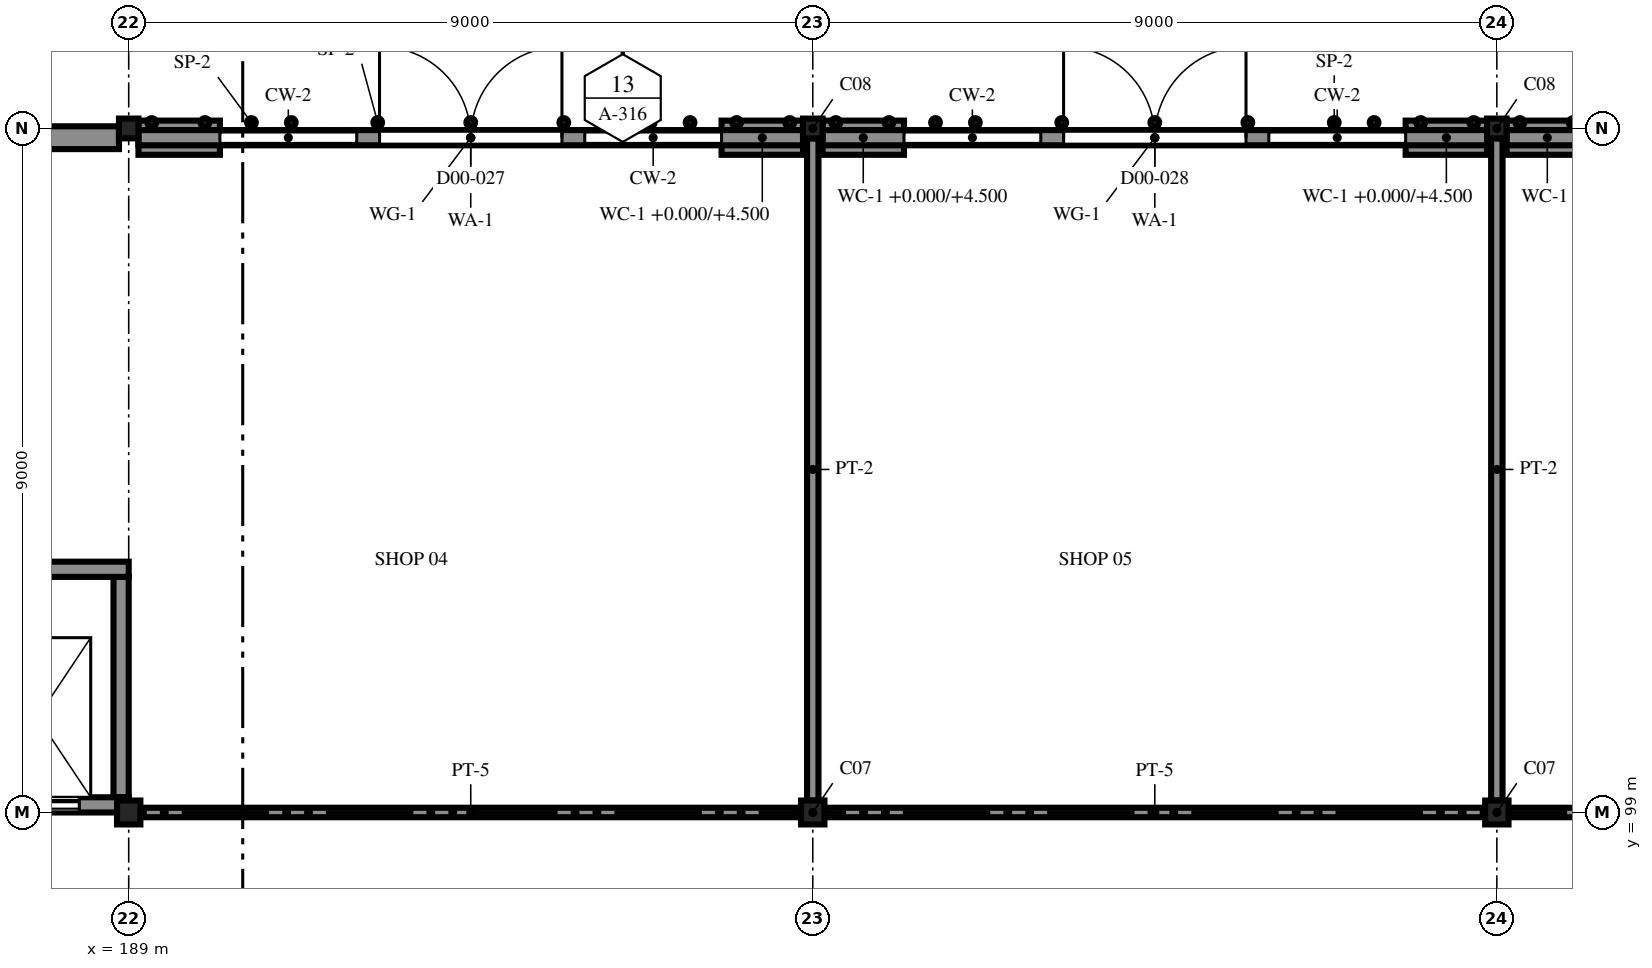
"""IFC4 building model, lengths in metres.
Left out: names, types, materials, properties, quantities, classifications, styles, units other than length and angle.
Written with IfcOpenShell. Run it as: python <this file> out.ifc"""

import sys

from ifc_helpers import new_model, si_unit, direction, frame, frame_2d, origin, origin_2d, place, context, subcontext, project, spatial, polyline, rectangle, i_section, outline, extrude, element, fill, save


model = new_model("IFC4")
c1 = context("Model", 3, precision=1e-05, world=origin(), true_north=direction((0.0, 1.0)))
c2 = subcontext(c1, "Body", "Model", "MODEL_VIEW")
j1 = project(units=[si_unit("LENGTHUNIT", "METRE"), si_unit("PLANEANGLEUNIT", "RADIAN")], contexts=[c1])
p1 = place(None, origin())
s1 = spatial("IfcSite", under=j1, at=p1, CompositionType="ELEMENT")
p2 = place(p1, origin())
s2 = spatial("IfcBuilding", under=s1, at=p2, CompositionType="ELEMENT")
p3 = place(p2, origin())
s3 = spatial("IfcBuildingStorey", under=s2, at=p3, CompositionType="ELEMENT", Elevation=0.0)
p4 = place(p3, frame((189.0, 99.0, -2.1), z_axis=(0.0, 0.0, 1.0), x_axis=(1.0, 0.0, 0.0)))
e1 = element("IfcColumn", 1, at=p4, inside=s3, PredefinedType="COLUMN", context=c2, shape_type="SweptSolid", body=[
    extrude(i_section(OverallWidth=0.307, OverallDepth=0.314, WebThickness=0.012, FlangeThickness=0.019, FilletRadius=0.015, at=origin_2d()), origin(), (0.0, 0.0, 1.0), 9.6),
])
p5 = place(p3, frame((189.0, 108.0, -2.1), z_axis=(0.0, 0.0, 1.0), x_axis=(1.0, 0.0, 0.0)))
e2 = element("IfcColumn", 2, at=p5, inside=s3, PredefinedType="COLUMN", context=c2, shape_type="SweptSolid", body=[
    extrude(i_section(OverallWidth=0.256, OverallDepth=0.26, WebThickness=0.01, FlangeThickness=0.017, FilletRadius=0.013, at=origin_2d()), origin(), (0.0, 0.0, 1.0), 9.6),
])
p6 = place(p3, frame((198.0, 99.0, -2.1), z_axis=(0.0, 0.0, 1.0), x_axis=(1.0, 0.0, 0.0)))
e3 = element("IfcColumn", 3, at=p6, inside=s3, PredefinedType="COLUMN", context=c2, shape_type="SweptSolid", body=[
    extrude(i_section(OverallWidth=0.307, OverallDepth=0.314, WebThickness=0.012, FlangeThickness=0.019, FilletRadius=0.015, at=origin_2d()), origin(), (0.0, 0.0, 1.0), 9.6),
])
p7 = place(p3, frame((198.0, 108.0, -2.1), z_axis=(0.0, 0.0, 1.0), x_axis=(1.0, 0.0, 0.0)))
e4 = element("IfcColumn", 4, at=p7, inside=s3, PredefinedType="COLUMN", context=c2, shape_type="SweptSolid", body=[
    extrude(i_section(OverallWidth=0.256, OverallDepth=0.26, WebThickness=0.01, FlangeThickness=0.017, FilletRadius=0.013, at=origin_2d()), origin(), (0.0, 0.0, 1.0), 9.6),
])
p8 = place(p3, frame((207.0, 99.0, -2.1), z_axis=(0.0, 0.0, 1.0), x_axis=(1.0, 0.0, 0.0)))
e5 = element("IfcColumn", 5, at=p8, inside=s3, PredefinedType="COLUMN", context=c2, shape_type="SweptSolid", body=[
    extrude(i_section(OverallWidth=0.307, OverallDepth=0.314, WebThickness=0.012, FlangeThickness=0.019, FilletRadius=0.015, at=origin_2d()), origin(), (0.0, 0.0, 1.0), 9.6),
])
p9 = place(p3, frame((207.0, 108.0, -2.1), z_axis=(0.0, 0.0, 1.0), x_axis=(1.0, 0.0, 0.0)))
e6 = element("IfcColumn", 6, at=p9, inside=s3, PredefinedType="COLUMN", context=c2, shape_type="SweptSolid", body=[
    extrude(i_section(OverallWidth=0.256, OverallDepth=0.26, WebThickness=0.01, FlangeThickness=0.017, FilletRadius=0.013, at=origin_2d()), origin(), (0.0, 0.0, 1.0), 9.6),
])
p10 = place(p3, frame((180.128, 107.878, 0.0), z_axis=(0.0, 0.0, 1.0), x_axis=(1.0, 0.0, 0.0)))
e7 = element("IfcWall", 7, at=p10, inside=s3, PredefinedType="SOLIDWALL", context=c2, shape_type="SweptSolid", body=[
    extrude(rectangle(XDim=8.744, YDim=0.3, at=frame_2d((4.372, 0.0))), origin(), (0.0, 0.0, 1.0), 6.692),
])
p11 = place(p10, frame((0.472, 0.0, 0.0)))
e8 = element("IfcOpeningElement", 8, at=p11, cuts=e7, PredefinedType="OPENING", context=c2, shape_type="SweptSolid", body=[
    extrude(rectangle(XDim=1.8, YDim=2.4, at=frame_2d((0.9, 1.2))), frame((0.0, 0.16, 0.0), z_axis=(0.0, -1.0, 0.0), x_axis=(1.0, 0.0, 0.0)), (0.0, 0.0, 1.0), 0.32),
])
p12 = place(p10, frame((0.772, 0.0, 2.55)))
e9 = element("IfcOpeningElement", 9, at=p12, cuts=e7, PredefinedType="OPENING", context=c2, shape_type="SweptSolid", body=[
    extrude(rectangle(XDim=1.2, YDim=0.6, at=frame_2d((0.6, 0.3))), frame((0.0, 0.16, 0.0), z_axis=(0.0, -1.0, 0.0), x_axis=(1.0, 0.0, 0.0)), (0.0, 0.0, 1.0), 0.32),
])
p13 = place(p10, frame((3.922, 0.0, 1.2)))
e10 = element("IfcOpeningElement", 10, at=p13, cuts=e7, PredefinedType="OPENING", context=c2, shape_type="SweptSolid", body=[
    extrude(rectangle(XDim=0.9, YDim=1.8, at=frame_2d((0.45, 0.9))), frame((0.0, 0.16, 0.0), z_axis=(0.0, -1.0, 0.0), x_axis=(1.0, 0.0, 0.0)), (0.0, 0.0, 1.0), 0.32),
])
p14 = place(p3, frame((189.128, 107.878, 0.0), z_axis=(0.0, 0.0, 1.0), x_axis=(1.0, 0.0, 0.0)))
e11 = element("IfcWall", 11, at=p14, inside=s3, PredefinedType="SOLIDWALL", context=c2, shape_type="SweptSolid", body=[
    extrude(rectangle(XDim=1.072, YDim=0.45, at=frame_2d((0.536, 0.0))), origin(), (0.0, 0.0, 1.0), 4.5),
])
p15 = place(p3, frame((192.0, 107.878, 0.0), z_axis=(0.0, 0.0, 1.0), x_axis=(1.0, 0.0, 0.0)))
e12 = element("IfcWall", 12, at=p15, inside=s3, PredefinedType="ELEMENTEDWALL", context=c2, shape_type="SweptSolid", body=[
    extrude(rectangle(XDim=3.0, YDim=0.15, at=frame_2d((1.5, 0.0))), origin(), (0.0, 0.0, 1.0), 4.5),
])
p16 = place(p15, frame((0.3, 0.0, 0.0)))
e13 = element("IfcOpeningElement", 13, at=p16, cuts=e12, PredefinedType="OPENING", context=c2, shape_type="SweptSolid", body=[
    extrude(rectangle(XDim=2.4, YDim=2.7, at=frame_2d((1.2, 1.35))), frame((0.0, 0.085, 0.0), z_axis=(0.0, -1.0, 0.0), x_axis=(1.0, 0.0, 0.0)), (0.0, 0.0, 1.0), 0.17),
])
p17 = place(p3, frame((196.8, 107.878, 0.0), z_axis=(0.0, 0.0, 1.0), x_axis=(1.0, 0.0, 0.0)))
e14 = element("IfcWall", 14, at=p17, inside=s3, PredefinedType="SOLIDWALL", context=c2, shape_type="SweptSolid", body=[
    extrude(rectangle(XDim=1.072, YDim=0.45, at=frame_2d((0.536, 0.0))), origin(), (0.0, 0.0, 1.0), 4.5),
])
p18 = place(p3, frame((189.128, 107.878, 4.9), z_axis=(0.0, 0.0, 1.0), x_axis=(1.0, 0.0, 0.0)))
e15 = element("IfcWall", 15, at=p18, inside=s3, PredefinedType="SOLIDWALL", context=c2, shape_type="SweptSolid", body=[
    extrude(rectangle(XDim=8.744, YDim=0.2, at=frame_2d((4.372, 0.0))), origin(), (0.0, 0.0, 1.0), 1.792),
])
p19 = place(p3, frame((198.128, 107.878, 0.0), z_axis=(0.0, 0.0, 1.0), x_axis=(1.0, 0.0, 0.0)))
e16 = element("IfcWall", 16, at=p19, inside=s3, PredefinedType="SOLIDWALL", context=c2, shape_type="SweptSolid", body=[
    extrude(rectangle(XDim=1.072, YDim=0.45, at=frame_2d((0.536, 0.0))), origin(), (0.0, 0.0, 1.0), 4.5),
])
p20 = place(p3, frame((201.0, 107.878, 0.0), z_axis=(0.0, 0.0, 1.0), x_axis=(1.0, 0.0, 0.0)))
e17 = element("IfcWall", 17, at=p20, inside=s3, PredefinedType="ELEMENTEDWALL", context=c2, shape_type="SweptSolid", body=[
    extrude(rectangle(XDim=3.0, YDim=0.15, at=frame_2d((1.5, 0.0))), origin(), (0.0, 0.0, 1.0), 4.5),
])
p21 = place(p20, frame((0.3, 0.0, 0.0)))
e18 = element("IfcOpeningElement", 18, at=p21, cuts=e17, PredefinedType="OPENING", context=c2, shape_type="SweptSolid", body=[
    extrude(rectangle(XDim=2.4, YDim=2.7, at=frame_2d((1.2, 1.35))), frame((0.0, 0.085, 0.0), z_axis=(0.0, -1.0, 0.0), x_axis=(1.0, 0.0, 0.0)), (0.0, 0.0, 1.0), 0.17),
])
p22 = place(p3, frame((205.8, 107.878, 0.0), z_axis=(0.0, 0.0, 1.0), x_axis=(1.0, 0.0, 0.0)))
e19 = element("IfcWall", 19, at=p22, inside=s3, PredefinedType="SOLIDWALL", context=c2, shape_type="SweptSolid", body=[
    extrude(rectangle(XDim=1.072, YDim=0.45, at=frame_2d((0.536, 0.0))), origin(), (0.0, 0.0, 1.0), 4.5),
])
p23 = place(p3, frame((198.128, 107.878, 4.9), z_axis=(0.0, 0.0, 1.0), x_axis=(1.0, 0.0, 0.0)))
e20 = element("IfcWall", 20, at=p23, inside=s3, PredefinedType="SOLIDWALL", context=c2, shape_type="SweptSolid", body=[
    extrude(rectangle(XDim=8.744, YDim=0.2, at=frame_2d((4.372, 0.0))), origin(), (0.0, 0.0, 1.0), 1.792),
])
p24 = place(p3, frame((207.128, 107.878, 0.0), z_axis=(0.0, 0.0, 1.0), x_axis=(1.0, 0.0, 0.0)))
e21 = element("IfcWall", 21, at=p24, inside=s3, PredefinedType="SOLIDWALL", context=c2, shape_type="SweptSolid", body=[
    extrude(rectangle(XDim=1.072, YDim=0.45, at=frame_2d((0.536, 0.0))), origin(), (0.0, 0.0, 1.0), 4.5),
])
p25 = place(p3, frame((207.128, 107.878, 4.9), z_axis=(0.0, 0.0, 1.0), x_axis=(1.0, 0.0, 0.0)))
e22 = element("IfcWall", 22, at=p25, inside=s3, PredefinedType="SOLIDWALL", context=c2, shape_type="SweptSolid", body=[
    extrude(rectangle(XDim=8.744, YDim=0.2, at=frame_2d((4.372, 0.0))), origin(), (0.0, 0.0, 1.0), 1.792),
])
p26 = place(p3, frame((186.602, 99.1, -1.6), z_axis=(0.0, 0.0, 1.0), x_axis=(1.0, 0.0, 0.0)))
e23 = element("IfcWall", 23, at=p26, inside=s3, PredefinedType="SOLIDWALL", context=c2, shape_type="SweptSolid", body=[
    extrude(rectangle(XDim=2.398, YDim=0.2, at=frame_2d((1.199, 0.0))), origin(), (0.0, 0.0, 1.0), 8.357),
])
p27 = place(p26, frame((0.648, 0.0, 1.6)))
e24 = element("IfcOpeningElement", 24, at=p27, cuts=e23, PredefinedType="OPENING", context=c2, shape_type="SweptSolid", body=[
    extrude(rectangle(XDim=1.1, YDim=2.1, at=frame_2d((0.55, 1.05))), frame((0.0, 0.11, 0.0), z_axis=(0.0, -1.0, 0.0), x_axis=(1.0, 0.0, 0.0)), (0.0, 0.0, 1.0), 0.22),
])
p28 = place(p3, frame((186.602, 102.2, -1.6), z_axis=(0.0, 0.0, 1.0), x_axis=(1.0, 0.0, 0.0)))
e25 = element("IfcWall", 25, at=p28, inside=s3, PredefinedType="SOLIDWALL", context=c2, shape_type="SweptSolid", body=[
    extrude(rectangle(XDim=2.398, YDim=0.2, at=frame_2d((1.199, 0.0))), origin(), (0.0, 0.0, 1.0), 8.357),
])
p29 = place(p3, frame((188.9, 99.2, -1.6), z_axis=(0.0, 0.0, 1.0), x_axis=(0.0, 1.0, 0.0)))
e26 = element("IfcWall", 26, at=p29, inside=s3, PredefinedType="SOLIDWALL", context=c2, shape_type="SweptSolid", body=[
    extrude(rectangle(XDim=2.9, YDim=0.2, at=frame_2d((1.45, 0.0))), origin(), (0.0, 0.0, 1.0), 8.357),
])
for number, where, z_axis, x_axis in (
    (27, (207.154, 99.0, 0.0), (0.0, 0.0, 1.0), (1.0, 0.0, 0.0)),
    (28, (198.154, 99.0, 0.0), (0.0, 0.0, 1.0), (1.0, 0.0, 0.0)),
    (29, (189.154, 99.0, 0.0), (0.0, 0.0, 1.0), (1.0, 0.0, 0.0)),
):
    element("IfcWall", number, at=place(p3, frame(where, z_axis=z_axis, x_axis=x_axis)), inside=s3, PredefinedType="PARTITIONING", context=c2, shape_type="SweptSolid", body=[
        extrude(rectangle(XDim=8.692, YDim=0.125, at=frame_2d((4.346, 0.0))), origin(), (0.0, 0.0, 1.0), 6.757),
    ])
for number, where, z_axis, x_axis in (
    (30, (198.0, 107.87, 0.0), (0.0, 0.0, 1.0), (0.0, -1.0, 0.0)),
    (31, (207.0, 107.87, 0.0), (0.0, 0.0, 1.0), (0.0, -1.0, 0.0)),
):
    element("IfcWall", number, at=place(p3, frame(where, z_axis=z_axis, x_axis=x_axis)), inside=s3, PredefinedType="PARTITIONING", context=c2, shape_type="SweptSolid", body=[
        extrude(rectangle(XDim=8.713, YDim=0.15, at=frame_2d((4.356, 0.0))), origin(), (0.0, 0.0, 1.0), 6.6),
    ])
p30 = place(p16, origin())
e32 = element("IfcDoor", 32, at=p30, inside=s3, OperationType="DOUBLE_DOOR_SINGLE_SWING", PredefinedType="DOOR", context=c2, shape_type="SweptSolid", body=[
    extrude(outline(polyline([(0.0, 0.0), (0.07, 0.0), (0.07, 2.63), (2.33, 2.63), (2.33, 0.0), (2.4, 0.0), (2.4, 2.7), (0.0, 2.7), (0.0, 0.0)])), frame((0.0, 0.025, 0.0), z_axis=(0.0, -1.0, 0.0), x_axis=(1.0, 0.0, 0.0)), (0.0, 0.0, 1.0), 0.05),
    extrude(outline(polyline([(0.074, 0.01), (1.197, 0.01), (1.197, 2.626), (0.074, 2.626), (0.074, 0.01)]), holes=[polyline([(0.164, 0.31), (1.107, 0.31), (1.107, 2.536), (0.164, 2.536), (0.164, 0.31)])]), frame((0.0, 0.017, 0.0), z_axis=(0.0, -1.0, 0.0), x_axis=(1.0, 0.0, 0.0)), (0.0, 0.0, 1.0), 0.035),
    extrude(rectangle(XDim=0.943, YDim=2.226, at=frame_2d((0.635, 1.423))), frame((0.0, 0.006, 0.0), z_axis=(0.0, -1.0, 0.0), x_axis=(1.0, 0.0, 0.0)), (0.0, 0.0, 1.0), 0.012),
    extrude(outline(polyline([(1.203, 0.01), (2.326, 0.01), (2.326, 2.626), (1.203, 2.626), (1.203, 0.01)]), holes=[polyline([(1.293, 0.31), (2.236, 0.31), (2.236, 2.536), (1.293, 2.536), (1.293, 0.31)])]), frame((0.0, 0.017, 0.0), z_axis=(0.0, -1.0, 0.0), x_axis=(1.0, 0.0, 0.0)), (0.0, 0.0, 1.0), 0.035),
    extrude(rectangle(XDim=0.943, YDim=2.226, at=frame_2d((1.764, 1.423))), frame((0.0, 0.006, 0.0), z_axis=(0.0, -1.0, 0.0), x_axis=(1.0, 0.0, 0.0)), (0.0, 0.0, 1.0), 0.012),
])
fill(e13, e32)
p31 = place(p21, origin())
e33 = element("IfcDoor", 33, at=p31, inside=s3, OperationType="DOUBLE_DOOR_SINGLE_SWING", PredefinedType="DOOR", context=c2, shape_type="SweptSolid", body=[
    extrude(outline(polyline([(0.0, 0.0), (0.07, 0.0), (0.07, 2.63), (2.33, 2.63), (2.33, 0.0), (2.4, 0.0), (2.4, 2.7), (0.0, 2.7), (0.0, 0.0)])), frame((0.0, 0.025, 0.0), z_axis=(0.0, -1.0, 0.0), x_axis=(1.0, 0.0, 0.0)), (0.0, 0.0, 1.0), 0.05),
    extrude(outline(polyline([(0.074, 0.01), (1.197, 0.01), (1.197, 2.626), (0.074, 2.626), (0.074, 0.01)]), holes=[polyline([(0.164, 0.31), (1.107, 0.31), (1.107, 2.536), (0.164, 2.536), (0.164, 0.31)])]), frame((0.0, 0.017, 0.0), z_axis=(0.0, -1.0, 0.0), x_axis=(1.0, 0.0, 0.0)), (0.0, 0.0, 1.0), 0.035),
    extrude(rectangle(XDim=0.943, YDim=2.226, at=frame_2d((0.635, 1.423))), frame((0.0, 0.006, 0.0), z_axis=(0.0, -1.0, 0.0), x_axis=(1.0, 0.0, 0.0)), (0.0, 0.0, 1.0), 0.012),
    extrude(outline(polyline([(1.203, 0.01), (2.326, 0.01), (2.326, 2.626), (1.203, 2.626), (1.203, 0.01)]), holes=[polyline([(1.293, 0.31), (2.236, 0.31), (2.236, 2.536), (1.293, 2.536), (1.293, 0.31)])]), frame((0.0, 0.017, 0.0), z_axis=(0.0, -1.0, 0.0), x_axis=(1.0, 0.0, 0.0)), (0.0, 0.0, 1.0), 0.035),
    extrude(rectangle(XDim=0.943, YDim=2.226, at=frame_2d((1.764, 1.423))), frame((0.0, 0.006, 0.0), z_axis=(0.0, -1.0, 0.0), x_axis=(1.0, 0.0, 0.0)), (0.0, 0.0, 1.0), 0.012),
])
fill(e18, e33)
p32 = place(p27, origin())
e34 = element("IfcDoor", 34, at=p32, inside=s3, OperationType="SLIDING_TO_LEFT", PredefinedType="DOOR", context=c2, shape_type="SweptSolid", body=[
    extrude(outline(polyline([(0.0, 0.0), (0.07, 0.0), (0.07, 2.03), (1.03, 2.03), (1.03, 0.0), (1.1, 0.0), (1.1, 2.1), (0.0, 2.1), (0.0, 0.0)])), frame((0.0, 0.025, 0.0), z_axis=(0.0, -1.0, 0.0), x_axis=(1.0, 0.0, 0.0)), (0.0, 0.0, 1.0), 0.05),
    extrude(rectangle(XDim=0.524, YDim=2.016, at=frame_2d((0.336, 1.018))), frame((0.0, 0.018, 0.0), z_axis=(0.0, -1.0, 0.0), x_axis=(1.0, 0.0, 0.0)), (0.0, 0.0, 1.0), 0.016),
    extrude(rectangle(XDim=0.52, YDim=2.016, at=frame_2d((0.766, 1.018))), frame((0.0, -0.002, 0.0), z_axis=(0.0, -1.0, 0.0), x_axis=(1.0, 0.0, 0.0)), (0.0, 0.0, 1.0), 0.016),
])
fill(e24, e34)
save(model, sys.argv[1])
